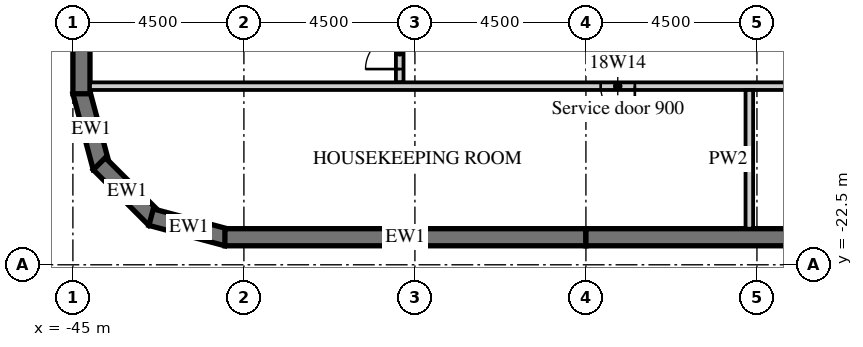
"""IFC4 building model, lengths in metres.
Left out: names, types, materials, properties, quantities, classifications, styles, units other than length and angle.
Written with IfcOpenShell. Run it as: python <this file> out.ifc"""

import sys

from ifc_helpers import new_model, si_unit, direction, frame, frame_2d, origin, place, context, subcontext, project, spatial, polyline, rectangle, outline, extrude, element, fill, save


model = new_model("IFC4")
c1 = context("Model", 3, precision=1e-05, world=origin(), true_north=direction((0.0, 1.0)))
c2 = subcontext(c1, "Body", "Model", "MODEL_VIEW")
j1 = project(units=[si_unit("LENGTHUNIT", "METRE"), si_unit("PLANEANGLEUNIT", "RADIAN")], contexts=[c1])
p1 = place(None, origin())
s1 = spatial("IfcSite", under=j1, at=p1, CompositionType="ELEMENT")
p2 = place(p1, origin())
s2 = spatial("IfcBuilding", under=s1, at=p2, CompositionType="ELEMENT")
p3 = place(p2, frame((0.0, 0.0, 89.7)))
s3 = spatial("IfcBuildingStorey", under=s2, at=p3, CompositionType="ELEMENT", Elevation=89.7)
p4 = place(p3, frame((-44.783, -17.942, 0.0), z_axis=(0.0, 0.0, 1.0), x_axis=(0.25881466832, -0.965926999034, 0.0)))
e1 = element("IfcWall", 1, at=p4, inside=s3, PredefinedType="SOLIDWALL", context=c2, shape_type="SweptSolid", body=[
    extrude(outline(polyline([(0.0, -0.225), (2.071, -0.225), (1.95, 0.225), (0.121, 0.225), (0.0, -0.225)])), origin(), (0.0, 0.0, 1.0), 3.02),
])
p5 = place(p3, frame((-44.305, -19.841, 0.0), z_axis=(0.0, 0.0, 1.0), x_axis=(0.707106781187, -0.707106781187, 0.0)))
e2 = element("IfcWall", 2, at=p5, inside=s3, PredefinedType="SOLIDWALL", context=c2, shape_type="SweptSolid", body=[
    extrude(outline(polyline([(0.0, -0.225), (2.071, -0.225), (1.95, 0.225), (0.121, 0.225), (0.0, -0.225)])), origin(), (0.0, 0.0, 1.0), 3.02),
])
p6 = place(p3, frame((-42.942, -21.247, 0.0), z_axis=(0.0, 0.0, 1.0), x_axis=(0.965926999034, -0.25881466832, 0.0)))
e3 = element("IfcWall", 3, at=p6, inside=s3, PredefinedType="SOLIDWALL", context=c2, shape_type="SweptSolid", body=[
    extrude(outline(polyline([(-0.0, -0.225), (2.07, -0.225), (1.95, 0.225), (0.12, 0.225), (-0.0, -0.225)])), origin(), (0.0, 0.0, 1.0), 3.02),
])
p7 = place(p3, frame((-41.0, -21.775, 0.0), z_axis=(0.0, 0.0, 1.0), x_axis=(1.0, 0.0, 0.0)))
e4 = element("IfcWall", 4, at=p7, inside=s3, PredefinedType="SOLIDWALL", context=c2, shape_type="SweptSolid", body=[
    extrude(rectangle(XDim=9.5, YDim=0.45, at=frame_2d((4.75, 0.0))), origin(), (0.0, 0.0, 1.0), 3.02),
])
p8 = place(p3, frame((-31.5, -21.775, 0.0), z_axis=(0.0, 0.0, 1.0), x_axis=(1.0, 0.0, 0.0)))
e5 = element("IfcWall", 5, at=p8, inside=s3, PredefinedType="SOLIDWALL", context=c2, shape_type="SweptSolid", body=[
    extrude(rectangle(XDim=18.0, YDim=0.45, at=frame_2d((9.0, 0.0))), origin(), (0.0, 0.0, 1.0), 3.02),
])
p9 = place(p3, frame((-44.775, 18.0, 0.0), z_axis=(0.0, 0.0, 1.0), x_axis=(0.0, -1.0, 0.0)))
e6 = element("IfcWall", 6, at=p9, inside=s3, PredefinedType="SOLIDWALL", context=c2, shape_type="SweptSolid", body=[
    extrude(rectangle(XDim=36.0, YDim=0.45, at=frame_2d((18.0, 0.0))), origin(), (0.0, 0.0, 1.0), 3.02),
])
p10 = place(p9, frame((3.9, 0.0, 0.45)))
e7 = element("IfcOpeningElement", 7, at=p10, cuts=e6, PredefinedType="OPENING", context=c2, shape_type="SweptSolid", body=[
    extrude(rectangle(XDim=3.3, YDim=2.25, at=frame_2d((1.65, 1.125))), frame((0.0, 0.235, 0.0), z_axis=(0.0, -1.0, 0.0), x_axis=(1.0, 0.0, 0.0)), (0.0, 0.0, 1.0), 0.47),
])
p11 = place(p9, frame((8.4, 0.0, 0.45)))
e8 = element("IfcOpeningElement", 8, at=p11, cuts=e6, PredefinedType="OPENING", context=c2, shape_type="SweptSolid", body=[
    extrude(rectangle(XDim=3.3, YDim=2.25, at=frame_2d((1.65, 1.125))), frame((0.0, 0.235, 0.0), z_axis=(0.0, -1.0, 0.0), x_axis=(1.0, 0.0, 0.0)), (0.0, 0.0, 1.0), 0.47),
])
p12 = place(p9, frame((12.9, 0.0, 0.45)))
e9 = element("IfcOpeningElement", 9, at=p12, cuts=e6, PredefinedType="OPENING", context=c2, shape_type="SweptSolid", body=[
    extrude(rectangle(XDim=3.3, YDim=2.25, at=frame_2d((1.65, 1.125))), frame((0.0, 0.235, 0.0), z_axis=(0.0, -1.0, 0.0), x_axis=(1.0, 0.0, 0.0)), (0.0, 0.0, 1.0), 0.47),
])
p13 = place(p3, frame((-36.4, -17.7, 0.0), z_axis=(0.0, 0.0, 1.0), x_axis=(0.0, 1.0, 0.0)))
e10 = element("IfcWall", 10, at=p13, inside=s3, PredefinedType="PARTITIONING", context=c2, shape_type="SweptSolid", body=[
    extrude(rectangle(XDim=15.95, YDim=0.2, at=frame_2d((7.975, 0.0))), origin(), (0.0, 0.0, 1.0), 3.02),
])
p14 = place(p13, frame((0.35, 0.0, 0.0)))
e11 = element("IfcOpeningElement", 11, at=p14, cuts=e10, PredefinedType="OPENING", context=c2, shape_type="SweptSolid", body=[
    extrude(rectangle(XDim=0.9, YDim=2.1, at=frame_2d((0.45, 1.05))), frame((0.0, 0.11, 0.0), z_axis=(0.0, -1.0, 0.0), x_axis=(1.0, 0.0, 0.0)), (0.0, 0.0, 1.0), 0.22),
])
p15 = place(p3, frame((-44.55, -17.8, 0.0), z_axis=(0.0, 0.0, 1.0), x_axis=(1.0, 0.0, 0.0)))
e12 = element("IfcWall", 12, at=p15, inside=s3, PredefinedType="PARTITIONING", context=c2, shape_type="SweptSolid", body=[
    extrude(rectangle(XDim=30.95, YDim=0.2, at=frame_2d((15.475, 0.0))), origin(), (0.0, 0.0, 1.0), 3.02),
])
p16 = place(p15, frame((13.438, 0.0, 0.0)))
e13 = element("IfcOpeningElement", 13, at=p16, cuts=e12, PredefinedType="OPENING", context=c2, shape_type="SweptSolid", body=[
    extrude(rectangle(XDim=0.9, YDim=2.1, at=frame_2d((0.45, 1.05))), frame((0.0, 0.11, 0.0), z_axis=(0.0, -1.0, 0.0), x_axis=(1.0, 0.0, 0.0)), (0.0, 0.0, 1.0), 0.22),
])
p17 = place(p15, frame((21.738, 0.0, 0.0)))
e14 = element("IfcOpeningElement", 14, at=p17, cuts=e12, PredefinedType="OPENING", context=c2, shape_type="SweptSolid", body=[
    extrude(rectangle(XDim=0.9, YDim=2.1, at=frame_2d((0.45, 1.05))), frame((0.0, 0.11, 0.0), z_axis=(0.0, -1.0, 0.0), x_axis=(1.0, 0.0, 0.0)), (0.0, 0.0, 1.0), 0.22),
])
p18 = place(p3, frame((-27.2, -21.55, 0.0), z_axis=(0.0, 0.0, 1.0), x_axis=(0.0, 1.0, 0.0)))
e15 = element("IfcWall", 15, at=p18, inside=s3, PredefinedType="PARTITIONING", context=c2, shape_type="SweptSolid", body=[
    extrude(rectangle(XDim=3.65, YDim=0.2, at=frame_2d((1.825, 0.0))), origin(), (0.0, 0.0, 1.0), 3.02),
])
p19 = place(p16, origin())
e16 = element("IfcDoor", 16, at=p19, inside=s3, OperationType="SINGLE_SWING_RIGHT", PredefinedType="DOOR", context=c2, shape_type="SweptSolid", body=[
    extrude(rectangle(XDim=0.9, YDim=2.1, at=frame_2d((0.45, 1.05))), frame((0.0, 0.025, 0.0), z_axis=(0.0, -1.0, 0.0), x_axis=(1.0, 0.0, 0.0)), (0.0, 0.0, 1.0), 0.05),
])
fill(e13, e16)
p20 = place(p14, origin())
e17 = element("IfcDoor", 17, at=p20, inside=s3, OperationType="SINGLE_SWING_LEFT", PredefinedType="DOOR", context=c2, shape_type="SweptSolid", body=[
    extrude(rectangle(XDim=0.9, YDim=2.1, at=frame_2d((0.45, 1.05))), frame((0.0, 0.025, 0.0), z_axis=(0.0, -1.0, 0.0), x_axis=(1.0, 0.0, 0.0)), (0.0, 0.0, 1.0), 0.05),
])
fill(e11, e17)
save(model, sys.argv[1])
